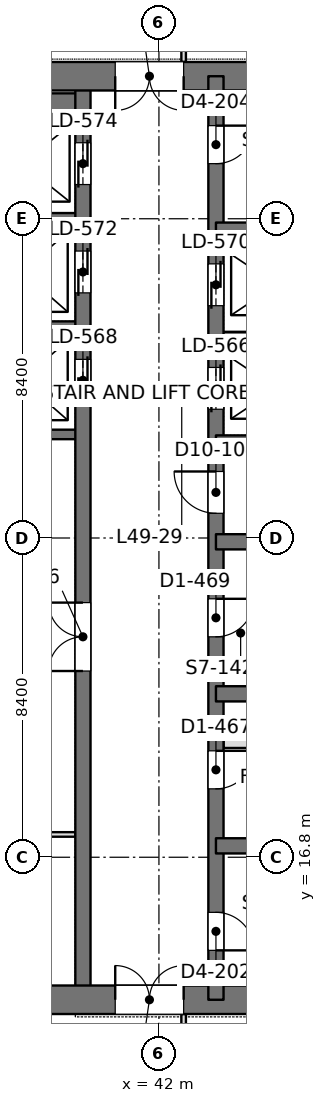
"""IFC4 building model, lengths in metres.
Left out: names, types, materials, properties, quantities, classifications, styles, units other than length and angle.
Written with IfcOpenShell. Run it as: python <this file> out.ifc"""

import sys

from ifc_helpers import new_model, si_unit, direction, frame, frame_2d, origin, place, context, subcontext, project, spatial, rectangle, extrude, element, fill, save


model = new_model("IFC4")
c1 = context("Model", 3, precision=1e-05, world=origin(), true_north=direction((0.0, 1.0)))
c2 = subcontext(c1, "Body", "Model", "MODEL_VIEW")
j1 = project(units=[si_unit("LENGTHUNIT", "METRE"), si_unit("PLANEANGLEUNIT", "RADIAN")], contexts=[c1])
p1 = place(None, origin())
s1 = spatial("IfcSite", under=j1, at=p1, CompositionType="ELEMENT")
p2 = place(p1, origin())
s2 = spatial("IfcBuilding", under=s1, at=p2, CompositionType="ELEMENT")
p3 = place(p2, frame((0.0, 0.0, 215.4)))
s3 = spatial("IfcBuildingStorey", under=s2, at=p3, CompositionType="ELEMENT", Elevation=215.4)
p4 = place(p3, frame((33.675, 13.05, 0.0), z_axis=(0.0, 0.0, 1.0), x_axis=(1.0, 0.0, 0.0)))
e1 = element("IfcWall", 1, at=p4, inside=s3, PredefinedType="SHEAR", context=c2, shape_type="SweptSolid", body=[
    extrude(rectangle(XDim=17.85, YDim=0.75, at=frame_2d((8.925, 0.0))), origin(), (0.0, 0.0, 1.0), 4.2),
])
p5 = place(p4, frame((7.175, 0.0, 0.0)))
e2 = element("IfcOpeningElement", 2, at=p5, cuts=e1, PredefinedType="OPENING", context=c2, shape_type="SweptSolid", body=[
    extrude(rectangle(XDim=1.8, YDim=2.4, at=frame_2d((0.9, 1.2))), frame((0.0, 0.385, 0.0), z_axis=(0.0, -1.0, 0.0), x_axis=(1.0, 0.0, 0.0)), (0.0, 0.0, 1.0), 0.77),
])
p6 = place(p3, frame((33.675, 37.35, 0.0), z_axis=(0.0, 0.0, 1.0), x_axis=(1.0, 0.0, 0.0)))
e3 = element("IfcWall", 3, at=p6, inside=s3, PredefinedType="SHEAR", context=c2, shape_type="SweptSolid", body=[
    extrude(rectangle(XDim=17.85, YDim=0.75, at=frame_2d((8.925, 0.0))), origin(), (0.0, 0.0, 1.0), 4.2),
])
p7 = place(p6, frame((7.175, 0.0, 0.0)))
e4 = element("IfcOpeningElement", 4, at=p7, cuts=e3, PredefinedType="OPENING", context=c2, shape_type="SweptSolid", body=[
    extrude(rectangle(XDim=1.8, YDim=2.4, at=frame_2d((0.9, 1.2))), frame((0.0, 0.385, 0.0), z_axis=(0.0, -1.0, 0.0), x_axis=(1.0, 0.0, 0.0)), (0.0, 0.0, 1.0), 0.77),
])
p8 = place(p3, frame((43.5, 13.05, 0.0), z_axis=(0.0, 0.0, 1.0), x_axis=(0.0, 1.0, 0.0)))
e5 = element("IfcWall", 5, at=p8, inside=s3, PredefinedType="SHEAR", context=c2, shape_type="SweptSolid", body=[
    extrude(rectangle(XDim=24.3, YDim=0.4, at=frame_2d((12.15, 0.0))), origin(), (0.0, 0.0, 1.0), 4.2),
])
p9 = place(p8, frame((1.3, 0.0, 0.0)))
e6 = element("IfcOpeningElement", 6, at=p9, cuts=e5, PredefinedType="OPENING", context=c2, shape_type="SweptSolid", body=[
    extrude(rectangle(XDim=1.0, YDim=2.2, at=frame_2d((0.5, 1.1))), frame((0.0, 0.21, 0.0), z_axis=(0.0, -1.0, 0.0), x_axis=(1.0, 0.0, 0.0)), (0.0, 0.0, 1.0), 0.42),
])
p10 = place(p8, frame((22.0, 0.0, 0.0)))
e7 = element("IfcOpeningElement", 7, at=p10, cuts=e5, PredefinedType="OPENING", context=c2, shape_type="SweptSolid", body=[
    extrude(rectangle(XDim=1.0, YDim=2.2, at=frame_2d((0.5, 1.1))), frame((0.0, 0.21, 0.0), z_axis=(0.0, -1.0, 0.0), x_axis=(1.0, 0.0, 0.0)), (0.0, 0.0, 1.0), 0.42),
])
p11 = place(p8, frame((5.55, 0.0, 0.0)))
e8 = element("IfcOpeningElement", 8, at=p11, cuts=e5, PredefinedType="OPENING", context=c2, shape_type="SweptSolid", body=[
    extrude(rectangle(XDim=1.0, YDim=2.2, at=frame_2d((0.5, 1.1))), frame((0.0, 0.21, 0.0), z_axis=(0.0, -1.0, 0.0), x_axis=(1.0, 0.0, 0.0)), (0.0, 0.0, 1.0), 0.42),
])
p12 = place(p8, frame((9.55, 0.0, 0.0)))
e9 = element("IfcOpeningElement", 9, at=p12, cuts=e5, PredefinedType="OPENING", context=c2, shape_type="SweptSolid", body=[
    extrude(rectangle(XDim=1.0, YDim=2.2, at=frame_2d((0.5, 1.1))), frame((0.0, 0.21, 0.0), z_axis=(0.0, -1.0, 0.0), x_axis=(1.0, 0.0, 0.0)), (0.0, 0.0, 1.0), 0.42),
])
p13 = place(p8, frame((12.8, 0.0, 0.0)))
e10 = element("IfcOpeningElement", 10, at=p13, cuts=e5, PredefinedType="OPENING", context=c2, shape_type="SweptSolid", body=[
    extrude(rectangle(XDim=1.1, YDim=2.2, at=frame_2d((0.55, 1.1))), frame((0.0, 0.21, 0.0), z_axis=(0.0, -1.0, 0.0), x_axis=(1.0, 0.0, 0.0)), (0.0, 0.0, 1.0), 0.42),
])
p14 = place(p8, frame((15.538, 0.0, 0.0)))
e11 = element("IfcOpeningElement", 11, at=p14, cuts=e5, PredefinedType="OPENING", context=c2, shape_type="SweptSolid", body=[
    extrude(rectangle(XDim=1.1, YDim=2.2, at=frame_2d((0.55, 1.1))), frame((0.0, 0.21, 0.0), z_axis=(0.0, -1.0, 0.0), x_axis=(1.0, 0.0, 0.0)), (0.0, 0.0, 1.0), 0.42),
])
p15 = place(p8, frame((18.262, 0.0, 0.0)))
e12 = element("IfcOpeningElement", 12, at=p15, cuts=e5, PredefinedType="OPENING", context=c2, shape_type="SweptSolid", body=[
    extrude(rectangle(XDim=1.1, YDim=2.2, at=frame_2d((0.55, 1.1))), frame((0.0, 0.21, 0.0), z_axis=(0.0, -1.0, 0.0), x_axis=(1.0, 0.0, 0.0)), (0.0, 0.0, 1.0), 0.42),
])
p16 = place(p3, frame((40.0, 13.05, 0.0), z_axis=(0.0, 0.0, 1.0), x_axis=(0.0, 1.0, 0.0)))
e13 = element("IfcWall", 13, at=p16, inside=s3, PredefinedType="SHEAR", context=c2, shape_type="SweptSolid", body=[
    extrude(rectangle(XDim=24.3, YDim=0.4, at=frame_2d((12.15, 0.0))), origin(), (0.0, 0.0, 1.0), 4.2),
])
p17 = place(p16, frame((15.75, 0.0, 0.0)))
e14 = element("IfcOpeningElement", 14, at=p17, cuts=e13, PredefinedType="OPENING", context=c2, shape_type="SweptSolid", body=[
    extrude(rectangle(XDim=1.1, YDim=2.2, at=frame_2d((0.55, 1.1))), frame((0.0, 0.21, 0.0), z_axis=(0.0, -1.0, 0.0), x_axis=(1.0, 0.0, 0.0)), (0.0, 0.0, 1.0), 0.42),
])
p18 = place(p16, frame((18.6, 0.0, 0.0)))
e15 = element("IfcOpeningElement", 15, at=p18, cuts=e13, PredefinedType="OPENING", context=c2, shape_type="SweptSolid", body=[
    extrude(rectangle(XDim=1.1, YDim=2.2, at=frame_2d((0.55, 1.1))), frame((0.0, 0.21, 0.0), z_axis=(0.0, -1.0, 0.0), x_axis=(1.0, 0.0, 0.0)), (0.0, 0.0, 1.0), 0.42),
])
p19 = place(p16, frame((21.45, 0.0, 0.0)))
e16 = element("IfcOpeningElement", 16, at=p19, cuts=e13, PredefinedType="OPENING", context=c2, shape_type="SweptSolid", body=[
    extrude(rectangle(XDim=1.1, YDim=2.2, at=frame_2d((0.55, 1.1))), frame((0.0, 0.21, 0.0), z_axis=(0.0, -1.0, 0.0), x_axis=(1.0, 0.0, 0.0)), (0.0, 0.0, 1.0), 0.42),
])
p20 = place(p16, frame((8.65, 0.0, 0.0)))
e17 = element("IfcOpeningElement", 17, at=p20, cuts=e13, PredefinedType="OPENING", context=c2, shape_type="SweptSolid", body=[
    extrude(rectangle(XDim=1.8, YDim=2.4, at=frame_2d((0.9, 1.2))), frame((0.0, 0.21, 0.0), z_axis=(0.0, -1.0, 0.0), x_axis=(1.0, 0.0, 0.0)), (0.0, 0.0, 1.0), 0.42),
])
for number, where, z_axis, x_axis in (
    (18, (51.15, 17.1, 0.0), (0.0, 0.0, 1.0), (-1.0, 0.0, 0.0)),
    (19, (51.15, 21.1, 0.0), (0.0, 0.0, 1.0), (-1.0, 0.0, 0.0)),
    (20, (51.15, 25.1, 0.0), (0.0, 0.0, 1.0), (-1.0, 0.0, 0.0)),
    (21, (51.15, 27.7, 0.0), (0.0, 0.0, 1.0), (-1.0, 0.0, 0.0)),
    (22, (51.15, 33.3, 0.0), (0.0, 0.0, 1.0), (-1.0, 0.0, 0.0)),
):
    element("IfcWall", number, at=place(p3, frame(where, z_axis=z_axis, x_axis=x_axis)), inside=s3, PredefinedType="SHEAR", context=c2, shape_type="SweptSolid", body=[
        extrude(rectangle(XDim=7.65, YDim=0.4, at=frame_2d((3.825, 0.0))), origin(), (0.0, 0.0, 1.0), 4.2),
    ])
p21 = place(p3, frame((46.7, 30.5, 0.0), z_axis=(0.0, 0.0, 1.0), x_axis=(-1.0, 0.0, 0.0)))
e23 = element("IfcWall", 23, at=p21, inside=s3, PredefinedType="SHEAR", context=c2, shape_type="SweptSolid", body=[
    extrude(rectangle(XDim=3.2, YDim=0.25, at=frame_2d((1.6, 0.0))), origin(), (0.0, 0.0, 1.0), 4.2),
])
p22 = place(p3, frame((40.0, 27.925, 0.0), z_axis=(0.0, 0.0, 1.0), x_axis=(-1.0, 0.0, 0.0)))
e24 = element("IfcWall", 24, at=p22, inside=s3, PredefinedType="SHEAR", context=c2, shape_type="SweptSolid", body=[
    extrude(rectangle(XDim=5.95, YDim=0.25, at=frame_2d((2.975, 0.0))), origin(), (0.0, 0.0, 1.0), 4.2),
])
for number, where, z_axis, x_axis in (
    (25, (40.0, 30.775, 0.0), (0.0, 0.0, 1.0), (-1.0, 0.0, 0.0)),
    (26, (40.0, 33.625, 0.0), (0.0, 0.0, 1.0), (-1.0, 0.0, 0.0)),
):
    element("IfcWall", number, at=place(p3, frame(where, z_axis=z_axis, x_axis=x_axis)), inside=s3, PredefinedType="SHEAR", context=c2, shape_type="SweptSolid", body=[
        extrude(rectangle(XDim=3.2, YDim=0.25, at=frame_2d((1.6, 0.0))), origin(), (0.0, 0.0, 1.0), 4.2),
    ])
p23 = place(p3, frame((40.0, 36.625, 0.0), z_axis=(0.0, 0.0, 1.0), x_axis=(-1.0, 0.0, 0.0)))
e27 = element("IfcWall", 27, at=p23, inside=s3, PredefinedType="SHEAR", context=c2, shape_type="SweptSolid", body=[
    extrude(rectangle(XDim=3.2, YDim=0.55, at=frame_2d((1.6, 0.0))), origin(), (0.0, 0.0, 1.0), 4.2),
])
p24 = place(p3, frame((33.898, 17.4, 0.0), z_axis=(0.0, 0.0, 1.0), x_axis=(1.0, 0.0, 0.0)))
e28 = element("IfcWall", 28, at=p24, inside=s3, PredefinedType="PARTITIONING", context=c2, shape_type="SweptSolid", body=[
    extrude(rectangle(XDim=5.904, YDim=0.12, at=frame_2d((2.952, 0.0))), origin(), (0.0, 0.0, 1.0), 3.55),
])
p25 = place(p3, frame((42.65, 10.758, 0.0), z_axis=(0.0, 0.0, 1.0), x_axis=(0.0, 1.0, 0.0)))
e29 = element("IfcWall", 29, at=p25, inside=s3, PredefinedType="PARTITIONING", context=c2, shape_type="SweptSolid", body=[
    extrude(rectangle(XDim=1.918, YDim=0.12, at=frame_2d((0.959, 0.0))), origin(), (0.0, 0.0, 1.0), 4.05),
])
p26 = place(p25, frame((0.392, 0.0, 0.0)))
e30 = element("IfcOpeningElement", 30, at=p26, cuts=e29, PredefinedType="OPENING", context=c2, shape_type="SweptSolid", body=[
    extrude(rectangle(XDim=1.0, YDim=2.4, at=frame_2d((0.5, 1.2))), frame((0.0, 0.07, 0.0), z_axis=(0.0, -1.0, 0.0), x_axis=(1.0, 0.0, 0.0)), (0.0, 0.0, 1.0), 0.14),
])
p27 = place(p3, frame((42.65, 37.724, 0.0), z_axis=(0.0, 0.0, 1.0), x_axis=(0.0, 1.0, 0.0)))
e31 = element("IfcWall", 31, at=p27, inside=s3, PredefinedType="PARTITIONING", context=c2, shape_type="SweptSolid", body=[
    extrude(rectangle(XDim=1.918, YDim=0.12, at=frame_2d((0.959, 0.0))), origin(), (0.0, 0.0, 1.0), 4.05),
])
p28 = place(p27, frame((0.526, 0.0, 0.0)))
e32 = element("IfcOpeningElement", 32, at=p28, cuts=e31, PredefinedType="OPENING", context=c2, shape_type="SweptSolid", body=[
    extrude(rectangle(XDim=1.0, YDim=2.4, at=frame_2d((0.5, 1.2))), frame((0.0, 0.07, 0.0), z_axis=(0.0, -1.0, 0.0), x_axis=(1.0, 0.0, 0.0)), (0.0, 0.0, 1.0), 0.14),
])
p29 = place(p3, frame((43.7, 19.8, 0.0), z_axis=(0.0, 0.0, 1.0), x_axis=(1.0, 0.0, 0.0)))
e33 = element("IfcWall", 33, at=p29, inside=s3, PredefinedType="PARTITIONING", context=c2, shape_type="SweptSolid", body=[
    extrude(rectangle(XDim=6.675, YDim=0.25, at=frame_2d((3.337, 0.0))), origin(), (0.0, 0.0, 1.0), 4.0),
])
p30 = place(p29, frame((2.863, 0.0, 0.0)))
e34 = element("IfcOpeningElement", 34, at=p30, cuts=e33, PredefinedType="OPENING", context=c2, shape_type="SweptSolid", body=[
    extrude(rectangle(XDim=0.9, YDim=2.2, at=frame_2d((0.45, 1.1))), frame((0.0, 0.135, 0.0), z_axis=(0.0, -1.0, 0.0), x_axis=(1.0, 0.0, 0.0)), (0.0, 0.0, 1.0), 0.27),
])
p31 = place(p5, origin())
e35 = element("IfcDoor", 35, at=p31, inside=s3, OperationType="DOUBLE_DOOR_SINGLE_SWING", PredefinedType="DOOR", context=c2, shape_type="SweptSolid", body=[
    extrude(rectangle(XDim=1.8, YDim=2.4, at=frame_2d((0.9, 1.2))), frame((0.0, 0.025, 0.0), z_axis=(0.0, -1.0, 0.0), x_axis=(1.0, 0.0, 0.0)), (0.0, 0.0, 1.0), 0.05),
])
fill(e2, e35)
p32 = place(p7, frame((1.8, 0.0, 0.0), z_axis=(0.0, 0.0, 1.0), x_axis=(-1.0, 0.0, 0.0)))
e36 = element("IfcDoor", 36, at=p32, inside=s3, OperationType="DOUBLE_DOOR_SINGLE_SWING", PredefinedType="DOOR", context=c2, shape_type="SweptSolid", body=[
    extrude(rectangle(XDim=1.8, YDim=2.4, at=frame_2d((0.9, 1.2))), frame((0.0, 0.025, 0.0), z_axis=(0.0, -1.0, 0.0), x_axis=(1.0, 0.0, 0.0)), (0.0, 0.0, 1.0), 0.05),
])
fill(e4, e36)
p33 = place(p9, frame((1.0, 0.0, 0.0), z_axis=(0.0, 0.0, 1.0), x_axis=(-1.0, 0.0, 0.0)))
e37 = element("IfcDoor", 37, at=p33, inside=s3, OperationType="SINGLE_SWING_RIGHT", PredefinedType="DOOR", context=c2, shape_type="SweptSolid", body=[
    extrude(rectangle(XDim=1.0, YDim=2.2, at=frame_2d((0.5, 1.1))), frame((0.0, 0.025, 0.0), z_axis=(0.0, -1.0, 0.0), x_axis=(1.0, 0.0, 0.0)), (0.0, 0.0, 1.0), 0.05),
])
fill(e6, e37)
p34 = place(p10, frame((1.0, 0.0, 0.0), z_axis=(0.0, 0.0, 1.0), x_axis=(-1.0, 0.0, 0.0)))
e38 = element("IfcDoor", 38, at=p34, inside=s3, OperationType="SINGLE_SWING_LEFT", PredefinedType="DOOR", context=c2, shape_type="SweptSolid", body=[
    extrude(rectangle(XDim=1.0, YDim=2.2, at=frame_2d((0.5, 1.1))), frame((0.0, 0.025, 0.0), z_axis=(0.0, -1.0, 0.0), x_axis=(1.0, 0.0, 0.0)), (0.0, 0.0, 1.0), 0.05),
])
fill(e7, e38)
p35 = place(p11, frame((1.0, 0.0, 0.0), z_axis=(0.0, 0.0, 1.0), x_axis=(-1.0, 0.0, 0.0)))
e39 = element("IfcDoor", 39, at=p35, inside=s3, OperationType="SINGLE_SWING_LEFT", PredefinedType="DOOR", context=c2, shape_type="SweptSolid", body=[
    extrude(rectangle(XDim=1.0, YDim=2.2, at=frame_2d((0.5, 1.1))), frame((0.0, 0.025, 0.0), z_axis=(0.0, -1.0, 0.0), x_axis=(1.0, 0.0, 0.0)), (0.0, 0.0, 1.0), 0.05),
])
fill(e8, e39)
p36 = place(p12, frame((1.0, 0.0, 0.0), z_axis=(0.0, 0.0, 1.0), x_axis=(-1.0, 0.0, 0.0)))
e40 = element("IfcDoor", 40, at=p36, inside=s3, OperationType="SINGLE_SWING_LEFT", PredefinedType="DOOR", context=c2, shape_type="SweptSolid", body=[
    extrude(rectangle(XDim=1.0, YDim=2.2, at=frame_2d((0.5, 1.1))), frame((0.0, 0.025, 0.0), z_axis=(0.0, -1.0, 0.0), x_axis=(1.0, 0.0, 0.0)), (0.0, 0.0, 1.0), 0.05),
])
fill(e9, e40)
p37 = place(p13, origin())
e41 = element("IfcDoor", 41, at=p37, inside=s3, OperationType="SINGLE_SWING_RIGHT", PredefinedType="DOOR", context=c2, shape_type="SweptSolid", body=[
    extrude(rectangle(XDim=1.1, YDim=2.2, at=frame_2d((0.55, 1.1))), frame((0.0, 0.025, 0.0), z_axis=(0.0, -1.0, 0.0), x_axis=(1.0, 0.0, 0.0)), (0.0, 0.0, 1.0), 0.05),
])
fill(e10, e41)
p38 = place(p17, origin())
e42 = element("IfcDoor", 42, at=p38, inside=s3, OperationType="DOUBLE_DOOR_SLIDING", PredefinedType="DOOR", context=c2, shape_type="SweptSolid", body=[
    extrude(rectangle(XDim=1.1, YDim=2.2, at=frame_2d((0.55, 1.1))), frame((0.0, 0.025, 0.0), z_axis=(0.0, -1.0, 0.0), x_axis=(1.0, 0.0, 0.0)), (0.0, 0.0, 1.0), 0.05),
])
fill(e14, e42)
p39 = place(p18, origin())
e43 = element("IfcDoor", 43, at=p39, inside=s3, OperationType="DOUBLE_DOOR_SLIDING", PredefinedType="DOOR", context=c2, shape_type="SweptSolid", body=[
    extrude(rectangle(XDim=1.1, YDim=2.2, at=frame_2d((0.55, 1.1))), frame((0.0, 0.025, 0.0), z_axis=(0.0, -1.0, 0.0), x_axis=(1.0, 0.0, 0.0)), (0.0, 0.0, 1.0), 0.05),
])
fill(e15, e43)
p40 = place(p19, origin())
e44 = element("IfcDoor", 44, at=p40, inside=s3, OperationType="DOUBLE_DOOR_SLIDING", PredefinedType="DOOR", context=c2, shape_type="SweptSolid", body=[
    extrude(rectangle(XDim=1.1, YDim=2.2, at=frame_2d((0.55, 1.1))), frame((0.0, 0.025, 0.0), z_axis=(0.0, -1.0, 0.0), x_axis=(1.0, 0.0, 0.0)), (0.0, 0.0, 1.0), 0.05),
])
fill(e16, e44)
p41 = place(p14, origin())
e45 = element("IfcDoor", 45, at=p41, inside=s3, OperationType="DOUBLE_DOOR_SLIDING", PredefinedType="DOOR", context=c2, shape_type="SweptSolid", body=[
    extrude(rectangle(XDim=1.1, YDim=2.2, at=frame_2d((0.55, 1.1))), frame((0.0, 0.025, 0.0), z_axis=(0.0, -1.0, 0.0), x_axis=(1.0, 0.0, 0.0)), (0.0, 0.0, 1.0), 0.05),
])
fill(e11, e45)
p42 = place(p15, origin())
e46 = element("IfcDoor", 46, at=p42, inside=s3, OperationType="DOUBLE_DOOR_SLIDING", PredefinedType="DOOR", context=c2, shape_type="SweptSolid", body=[
    extrude(rectangle(XDim=1.1, YDim=2.2, at=frame_2d((0.55, 1.1))), frame((0.0, 0.025, 0.0), z_axis=(0.0, -1.0, 0.0), x_axis=(1.0, 0.0, 0.0)), (0.0, 0.0, 1.0), 0.05),
])
fill(e12, e46)
p43 = place(p20, origin())
e47 = element("IfcDoor", 47, at=p43, inside=s3, OperationType="DOUBLE_DOOR_SINGLE_SWING", PredefinedType="DOOR", context=c2, shape_type="SweptSolid", body=[
    extrude(rectangle(XDim=1.8, YDim=2.4, at=frame_2d((0.9, 1.2))), frame((0.0, 0.025, 0.0), z_axis=(0.0, -1.0, 0.0), x_axis=(1.0, 0.0, 0.0)), (0.0, 0.0, 1.0), 0.05),
])
fill(e17, e47)
save(model, sys.argv[1])
